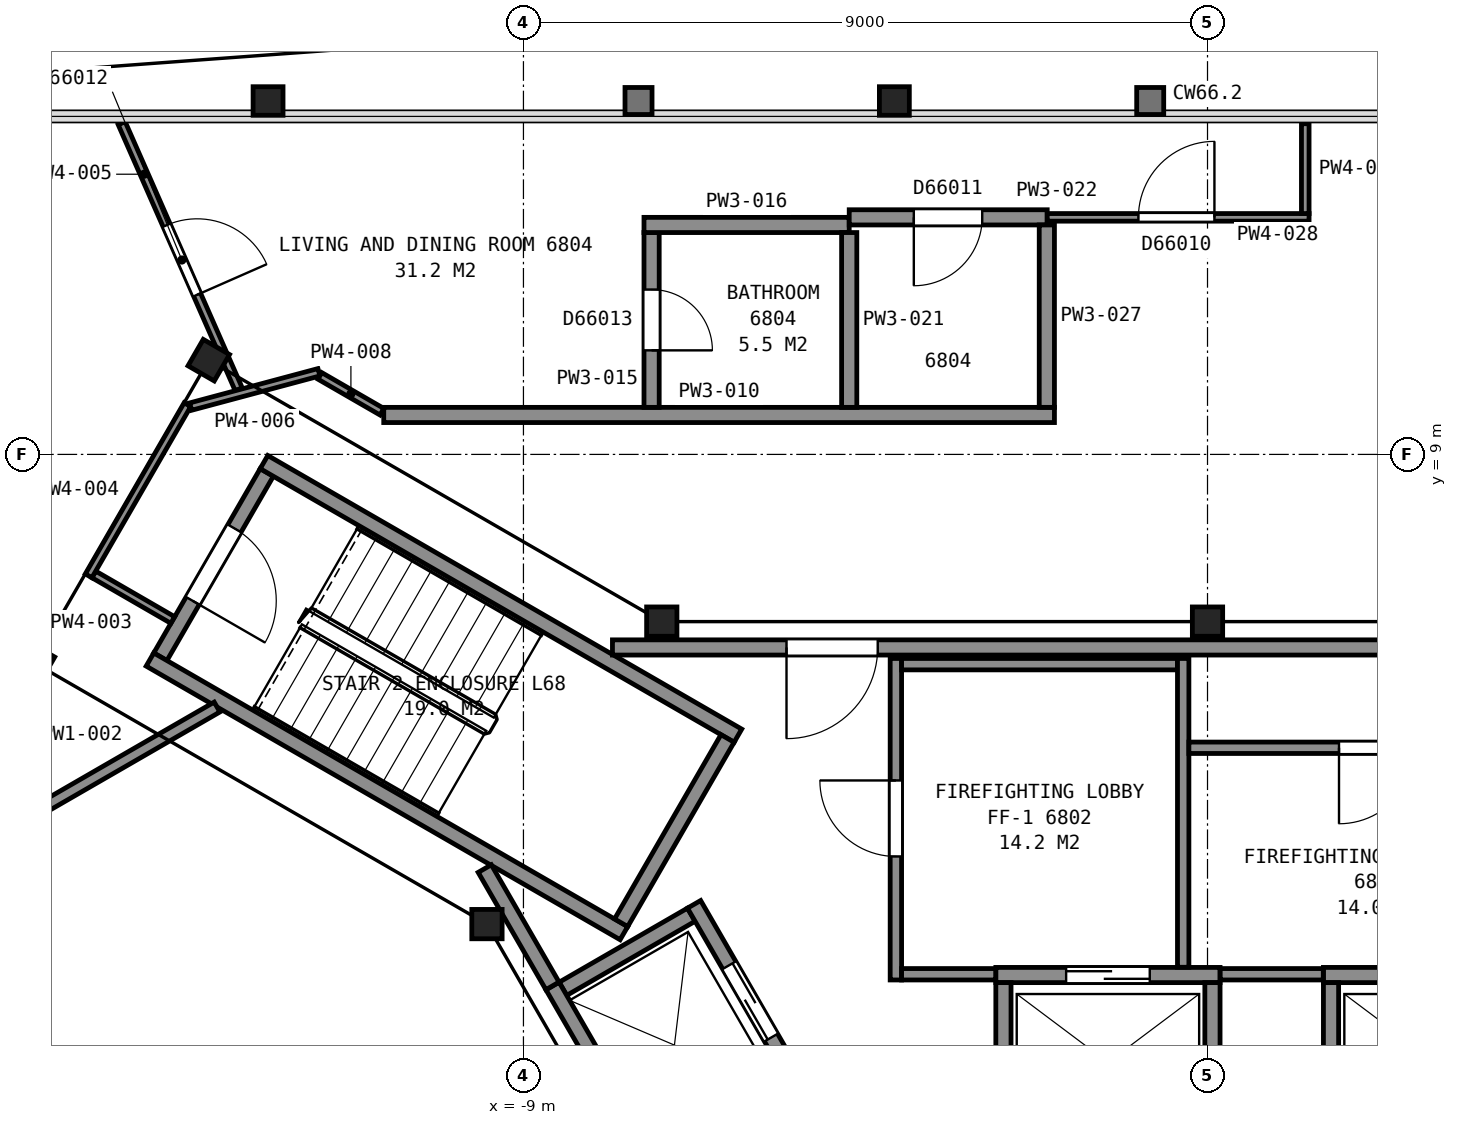
"""IFC4 building model, lengths in metres.
Left out: names, types, materials, properties, quantities, classifications, styles, units other than length and angle.
Written with IfcOpenShell. Run it as: python <this file> out.ifc"""

import sys

from ifc_helpers import new_model, si_unit, direction, frame, frame_2d, origin, origin_2d, place, context, subcontext, project, spatial, rectangle, i_section, extrude, element, fill, save


model = new_model("IFC4")
c1 = context("Model", 3, precision=1e-05, world=origin(), true_north=direction((0.0, 1.0)))
c2 = subcontext(c1, "Body", "Model", "MODEL_VIEW")
j1 = project(units=[si_unit("LENGTHUNIT", "METRE"), si_unit("PLANEANGLEUNIT", "RADIAN")], contexts=[c1])
p1 = place(None, origin())
s1 = spatial("IfcSite", under=j1, at=p1, CompositionType="ELEMENT")
p2 = place(p1, origin())
s2 = spatial("IfcBuilding", under=s1, at=p2, CompositionType="ELEMENT")
p3 = place(p2, frame((0.0, 0.0, 271.4)))
s3 = spatial("IfcBuildingStorey", under=s2, at=p3, CompositionType="ELEMENT", Elevation=271.4)
for number, where, z_axis, x_axis in (
    (1, (-4.12, 13.65, 0.0), (0.0, 0.0, 1.0), (1.0, 0.0, 0.0)),
    (2, (-12.36, 13.65, 0.0), (0.0, 0.0, 1.0), (1.0, 0.0, 0.0)),
):
    element("IfcColumn", number, at=place(p3, frame(where, z_axis=z_axis, x_axis=x_axis)), inside=s3, PredefinedType="COLUMN", context=c2, shape_type="SweptSolid", body=[
        extrude(i_section(OverallWidth=0.394, OverallDepth=0.376, WebThickness=0.017, FlangeThickness=0.028, FilletRadius=0.015, at=origin_2d()), origin(), (0.0, 0.0, 1.0), 3.7),
    ])
for number, where, z_axis, x_axis in (
    (3, (0.0, 6.8, 0.0), (0.0, 0.0, 1.0), (1.0, 0.0, 0.0)),
    (4, (-7.18, 6.8, 0.0), (0.0, 0.0, 1.0), (1.0, 0.0, 0.0)),
):
    element("IfcColumn", number, at=place(p3, frame(where, z_axis=z_axis, x_axis=x_axis)), inside=s3, PredefinedType="COLUMN", context=c2, shape_type="SweptSolid", body=[
        extrude(i_section(OverallWidth=0.399, OverallDepth=0.386, WebThickness=0.021, FlangeThickness=0.033, FilletRadius=0.015, at=origin_2d()), origin(), (0.0, 0.0, 1.0), 3.7),
    ])
for number, where, z_axis, x_axis in (
    (5, (-13.14, 10.24, 0.0), (0.0, 0.0, 1.0), (0.5, 0.866, 0.0)),
    (6, (-15.44, 6.26, 0.0), (0.0, 0.0, 1.0), (0.5, 0.866, 0.0)),
):
    element("IfcColumn", number, at=place(p3, frame(where, z_axis=z_axis, x_axis=x_axis)), inside=s3, PredefinedType="COLUMN", context=c2, shape_type="SweptSolid", body=[
        extrude(i_section(OverallWidth=0.401, OverallDepth=0.399, WebThickness=0.025, FlangeThickness=0.04, FilletRadius=0.015, at=origin_2d()), origin(), (0.0, 0.0, 1.0), 3.7),
    ])
p4 = place(p3, frame((-9.48, 2.82, 0.0), z_axis=(0.0, 0.0, 1.0), x_axis=(1.0, 0.0, 0.0)))
e7 = element("IfcColumn", 7, at=p4, inside=s3, PredefinedType="COLUMN", context=c2, shape_type="SweptSolid", body=[
    extrude(i_section(OverallWidth=0.399, OverallDepth=0.386, WebThickness=0.021, FlangeThickness=0.033, FilletRadius=0.015, at=origin_2d()), origin(), (0.0, 0.0, 1.0), 3.7),
])
p5 = place(p3, frame((-12.377, 8.762, 0.0), z_axis=(0.0, 0.0, 1.0), x_axis=(-0.500049511043, -0.865996816683, 0.0)))
e8 = element("IfcWall", 8, at=p5, inside=s3, PredefinedType="PARTITIONING", context=c2, shape_type="SweptSolid", body=[
    extrude(rectangle(XDim=2.8, YDim=0.2, at=frame_2d((1.4, 0.0))), origin(), (0.0, 0.0, 1.0), 3.45),
])
p6 = place(p5, frame((0.85, 0.0, 0.0)))
e9 = element("IfcOpeningElement", 9, at=p6, cuts=e8, PredefinedType="OPENING", context=c2, shape_type="SweptSolid", body=[
    extrude(rectangle(XDim=1.1, YDim=2.1, at=frame_2d((0.55, 1.05))), frame((0.0, 0.11, 0.0), z_axis=(0.0, -1.0, 0.0), x_axis=(1.0, 0.0, 0.0)), (0.0, 0.0, 1.0), 0.22),
])
for number, where, z_axis, x_axis in (
    (10, (-7.678, 2.701, 0.0), (0.0, 0.0, 1.0), (-0.866, 0.5, 0.0)),
    (11, (-6.178, 5.299, 0.0), (0.0, 0.0, 1.0), (-0.866, 0.5, 0.0)),
):
    element("IfcWall", number, at=place(p3, frame(where, z_axis=z_axis, x_axis=x_axis)), inside=s3, PredefinedType="PARTITIONING", context=c2, shape_type="SweptSolid", body=[
        extrude(rectangle(XDim=7.2, YDim=0.2, at=frame_2d((3.6, 0.0))), origin(), (0.0, 0.0, 1.0), 3.45),
    ])
p7 = place(p3, frame((-6.315, 5.262, 0.0), z_axis=(0.0, 0.0, 1.0), x_axis=(-0.500049511043, -0.865996816683, 0.0)))
e12 = element("IfcWall", 12, at=p7, inside=s3, PredefinedType="PARTITIONING", context=c2, shape_type="SweptSolid", body=[
    extrude(rectangle(XDim=2.8, YDim=0.2, at=frame_2d((1.4, 0.0))), origin(), (0.0, 0.0, 1.0), 3.45),
])
p8 = place(p3, frame((-2.785, 2.15, 0.0), z_axis=(0.0, 0.0, 1.0), x_axis=(1.0, 0.0, 0.0)))
e13 = element("IfcWall", 13, at=p8, inside=s3, PredefinedType="PARTITIONING", context=c2, shape_type="SweptSolid", body=[
    extrude(rectangle(XDim=2.95, YDim=0.2, at=frame_2d((1.475, 0.0))), origin(), (0.0, 0.0, 1.0), 3.7),
])
p9 = place(p8, frame((0.925, 0.0, 0.0)))
e14 = element("IfcOpeningElement", 14, at=p9, cuts=e13, PredefinedType="OPENING", context=c2, shape_type="SweptSolid", body=[
    extrude(rectangle(XDim=1.1, YDim=2.1, at=frame_2d((0.55, 1.05))), frame((0.0, 0.11, 0.0), z_axis=(0.0, -1.0, 0.0), x_axis=(1.0, 0.0, 0.0)), (0.0, 0.0, 1.0), 0.22),
])
p10 = place(p3, frame((1.525, 2.15, 0.0), z_axis=(0.0, 0.0, 1.0), x_axis=(1.0, 0.0, 0.0)))
e15 = element("IfcWall", 15, at=p10, inside=s3, PredefinedType="PARTITIONING", context=c2, shape_type="SweptSolid", body=[
    extrude(rectangle(XDim=2.95, YDim=0.2, at=frame_2d((1.475, 0.0))), origin(), (0.0, 0.0, 1.0), 3.7),
])
p11 = place(p10, frame((0.925, 0.0, 0.0)))
e16 = element("IfcOpeningElement", 16, at=p11, cuts=e15, PredefinedType="OPENING", context=c2, shape_type="SweptSolid", body=[
    extrude(rectangle(XDim=1.1, YDim=2.1, at=frame_2d((0.55, 1.05))), frame((0.0, 0.11, 0.0), z_axis=(0.0, -1.0, 0.0), x_axis=(1.0, 0.0, 0.0)), (0.0, 0.0, 1.0), 0.22),
])
for number, where, z_axis, x_axis in (
    (17, (-8.48, 1.969, 0.0), (0.0, 0.0, 1.0), (0.866, 0.5, 0.0)),
    (18, (1.625, 0.1, 0.0), (0.0, 0.0, 1.0), (0.0, 1.0, 0.0)),
    (19, (0.065, 0.1, 0.0), (0.0, 0.0, 1.0), (0.0, 1.0, 0.0)),
    (20, (-2.685, 0.1, 0.0), (0.0, 0.0, 1.0), (0.0, 1.0, 0.0)),
):
    element("IfcWall", number, at=place(p3, frame(where, z_axis=z_axis, x_axis=x_axis)), inside=s3, PredefinedType="PARTITIONING", context=c2, shape_type="SweptSolid", body=[
        extrude(rectangle(XDim=1.95, YDim=0.2, at=frame_2d((0.975, 0.0))), origin(), (0.0, 0.0, 1.0), 3.7),
    ])
p12 = place(p3, frame((-5.28, 0.525, 0.0), z_axis=(0.0, 0.0, 1.0), x_axis=(-0.500037662692, 0.866003658127, 0.0)))
e21 = element("IfcWall", 21, at=p12, inside=s3, PredefinedType="PARTITIONING", context=c2, shape_type="SweptSolid", body=[
    extrude(rectangle(XDim=2.95, YDim=0.2, at=frame_2d((1.475, 0.0))), origin(), (0.0, 0.0, 1.0), 3.7),
])
p13 = place(p12, frame((0.925, 0.0, 0.0)))
e22 = element("IfcOpeningElement", 22, at=p13, cuts=e21, PredefinedType="OPENING", context=c2, shape_type="SweptSolid", body=[
    extrude(rectangle(XDim=1.1, YDim=2.1, at=frame_2d((0.55, 1.05))), frame((0.0, 0.11, 0.0), z_axis=(0.0, -1.0, 0.0), x_axis=(1.0, 0.0, 0.0)), (0.0, 0.0, 1.0), 0.22),
])
p14 = place(p3, frame((-7.142, -0.55, 0.0), z_axis=(0.0, 0.0, 1.0), x_axis=(-0.49997559174, 0.866039495442, 0.0)))
e23 = element("IfcWall", 23, at=p14, inside=s3, PredefinedType="PARTITIONING", context=c2, shape_type="SweptSolid", body=[
    extrude(rectangle(XDim=2.95, YDim=0.2, at=frame_2d((1.475, 0.0))), origin(), (0.0, 0.0, 1.0), 3.7),
])
p15 = place(p3, frame((-9.509, 3.551, 0.0), z_axis=(0.0, 0.0, 1.0), x_axis=(0.499999136801, -0.866025902152, 0.0)))
e24 = element("IfcWall", 24, at=p15, inside=s3, PredefinedType="PARTITIONING", context=c2, shape_type="SweptSolid", body=[
    extrude(rectangle(XDim=1.782, YDim=0.2, at=frame_2d((0.891, 0.0))), origin(), (0.0, 0.0, 1.0), 3.45),
])
p16 = place(p3, frame((7.829, 6.46, 0.0), z_axis=(0.0, 0.0, 1.0), x_axis=(-1.0, 0.0, 0.0)))
e25 = element("IfcWall", 25, at=p16, inside=s3, PredefinedType="PARTITIONING", context=c2, shape_type="SweptSolid", body=[
    extrude(rectangle(XDim=15.658, YDim=0.2, at=frame_2d((7.829, 0.0))), origin(), (0.0, 0.0, 1.0), 3.45),
])
p17 = place(p16, frame((12.168, 0.0, 0.0)))
e26 = element("IfcOpeningElement", 26, at=p17, cuts=e25, PredefinedType="OPENING", context=c2, shape_type="SweptSolid", body=[
    extrude(rectangle(XDim=1.2, YDim=2.1, at=frame_2d((0.6, 1.05))), frame((0.0, 0.11, 0.0), z_axis=(0.0, -1.0, 0.0), x_axis=(1.0, 0.0, 0.0)), (0.0, 0.0, 1.0), 0.22),
])
p18 = place(p3, frame((-4.1, 2.085, 0.0), z_axis=(0.0, 0.0, 1.0), x_axis=(0.0, 1.0, 0.0)))
e27 = element("IfcWall", 27, at=p18, inside=s3, PredefinedType="PARTITIONING", context=c2, shape_type="SweptSolid", body=[
    extrude(rectangle(XDim=4.23, YDim=0.15, at=frame_2d((2.115, 0.0))), origin(), (0.0, 0.0, 1.0), 3.45),
])
p19 = place(p18, frame((1.625, 0.0, 0.0)))
e28 = element("IfcOpeningElement", 28, at=p19, cuts=e27, PredefinedType="OPENING", context=c2, shape_type="SweptSolid", body=[
    extrude(rectangle(XDim=1.0, YDim=2.1, at=frame_2d((0.5, 1.05))), frame((0.0, 0.085, 0.0), z_axis=(0.0, -1.0, 0.0), x_axis=(1.0, 0.0, 0.0)), (0.0, 0.0, 1.0), 0.17),
])
p20 = place(p3, frame((-4.025, 2.16, 0.0), z_axis=(0.0, 0.0, 1.0), x_axis=(1.0, 0.0, 0.0)))
e29 = element("IfcWall", 29, at=p20, inside=s3, PredefinedType="PARTITIONING", context=c2, shape_type="SweptSolid", body=[
    extrude(rectangle(XDim=1.238, YDim=0.15, at=frame_2d((0.619, 0.0))), origin(), (0.0, 0.0, 1.0), 3.45),
])
p21 = place(p3, frame((-4.025, 6.24, 0.0), z_axis=(0.0, 0.0, 1.0), x_axis=(1.0, 0.0, 0.0)))
e30 = element("IfcWall", 30, at=p21, inside=s3, PredefinedType="PARTITIONING", context=c2, shape_type="SweptSolid", body=[
    extrude(rectangle(XDim=3.63, YDim=0.15, at=frame_2d((1.815, 0.0))), origin(), (0.0, 0.0, 1.0), 3.45),
])
p22 = place(p3, frame((-0.32, 2.252, 0.0), z_axis=(0.0, 0.0, 1.0), x_axis=(0.0, 1.0, 0.0)))
e31 = element("IfcWall", 31, at=p22, inside=s3, PredefinedType="PARTITIONING", context=c2, shape_type="SweptSolid", body=[
    extrude(rectangle(XDim=4.063, YDim=0.15, at=frame_2d((2.031, 0.0))), origin(), (0.0, 0.0, 1.0), 3.45),
])
p23 = place(p3, frame((-0.245, 5.14, 0.0), z_axis=(0.0, 0.0, 1.0), x_axis=(1.0, 0.0, 0.0)))
e32 = element("IfcWall", 32, at=p23, inside=s3, PredefinedType="PARTITIONING", context=c2, shape_type="SweptSolid", body=[
    extrude(rectangle(XDim=5.11, YDim=0.15, at=frame_2d((2.555, 0.0))), origin(), (0.0, 0.0, 1.0), 3.45),
])
p24 = place(p23, frame((1.975, 0.0, 0.0)))
e33 = element("IfcOpeningElement", 33, at=p24, cuts=e32, PredefinedType="OPENING", context=c2, shape_type="SweptSolid", body=[
    extrude(rectangle(XDim=1.0, YDim=2.1, at=frame_2d((0.5, 1.05))), frame((0.0, 0.085, 0.0), z_axis=(0.0, -1.0, 0.0), x_axis=(1.0, 0.0, 0.0)), (0.0, 0.0, 1.0), 0.17),
])
p25 = place(p3, frame((0.167, 2.16, 0.0), z_axis=(0.0, 0.0, 1.0), x_axis=(1.0, 0.0, 0.0)))
e34 = element("IfcWall", 34, at=p25, inside=s3, PredefinedType="PARTITIONING", context=c2, shape_type="SweptSolid", body=[
    extrude(rectangle(XDim=1.356, YDim=0.15, at=frame_2d((0.678, 0.0))), origin(), (0.0, 0.0, 1.0), 3.45),
])
p26 = place(p3, frame((-15.489, 4.257, 0.0), z_axis=(0.0, 0.0, 1.0), x_axis=(0.866053804324, 0.499950805595, 0.0)))
e35 = element("IfcWall", 35, at=p26, inside=s3, PredefinedType="PARTITIONING", context=c2, shape_type="SweptSolid", body=[
    extrude(rectangle(XDim=2.838, YDim=0.15, at=frame_2d((1.419, 0.0))), origin(), (0.0, 0.0, 1.0), 2.723),
])
p27 = place(p3, frame((-14.653, 7.421, 0.0), z_axis=(0.0, 0.0, 1.0), x_axis=(0.865941482684, -0.500145327446, 0.0)))
e36 = element("IfcWall", 36, at=p27, inside=s3, PredefinedType="PARTITIONING", context=c2, shape_type="SweptSolid", body=[
    extrude(rectangle(XDim=1.199, YDim=0.1, at=frame_2d((0.6, 0.0))), origin(), (0.0, 0.0, 1.0), 2.723),
])
p28 = place(p3, frame((-14.721, 7.403, 0.0), z_axis=(0.0, 0.0, 1.0), x_axis=(0.500006934395, 0.866021400173, 0.0)))
e37 = element("IfcWall", 37, at=p28, inside=s3, PredefinedType="PARTITIONING", context=c2, shape_type="SweptSolid", body=[
    extrude(rectangle(XDim=2.6, YDim=0.1, at=frame_2d((1.3, 0.0))), origin(), (0.0, 0.0, 1.0), 2.723),
])
p29 = place(p3, frame((-12.747, 9.857, 0.0), z_axis=(0.0, 0.0, 1.0), x_axis=(-0.402509649346, 0.91541574281, 0.0)))
e38 = element("IfcWall", 38, at=p29, inside=s3, PredefinedType="PARTITIONING", context=c2, shape_type="SweptSolid", body=[
    extrude(rectangle(XDim=3.824, YDim=0.1, at=frame_2d((1.912, 0.0))), origin(), (0.0, 0.0, 1.0), 2.723),
])
p30 = place(p29, frame((1.357, 0.0, 0.0)))
e39 = element("IfcOpeningElement", 39, at=p30, cuts=e38, PredefinedType="OPENING", context=c2, shape_type="SweptSolid", body=[
    extrude(rectangle(XDim=1.0, YDim=2.1, at=frame_2d((0.5, 1.05))), frame((0.0, 0.06, 0.0), z_axis=(0.0, -1.0, 0.0), x_axis=(1.0, 0.0, 0.0)), (0.0, 0.0, 1.0), 0.12),
])
p31 = place(p3, frame((-13.378, 9.629, 0.0), z_axis=(0.0, 0.0, 1.0), x_axis=(0.966007272337, 0.258514892785, 0.0)))
e40 = element("IfcWall", 40, at=p31, inside=s3, PredefinedType="PARTITIONING", context=c2, shape_type="SweptSolid", body=[
    extrude(rectangle(XDim=1.747, YDim=0.1, at=frame_2d((0.874, 0.0))), origin(), (0.0, 0.0, 1.0), 2.723),
])
p32 = place(p3, frame((-11.678, 10.033, 0.0), z_axis=(0.0, 0.0, 1.0), x_axis=(0.866116627388, -0.499841962787, 0.0)))
e41 = element("IfcWall", 41, at=p32, inside=s3, PredefinedType="PARTITIONING", context=c2, shape_type="SweptSolid", body=[
    extrude(rectangle(XDim=0.943, YDim=0.1, at=frame_2d((0.472, 0.0))), origin(), (0.0, 0.0, 1.0), 2.723),
])
p33 = place(p3, frame((-10.838, 9.519, 0.0), z_axis=(0.0, 0.0, 1.0), x_axis=(1.0, 0.0, 0.0)))
e42 = element("IfcWall", 42, at=p33, inside=s3, PredefinedType="PARTITIONING", context=c2, shape_type="SweptSolid", body=[
    extrude(rectangle(XDim=8.824, YDim=0.2, at=frame_2d((4.412, 0.0))), origin(), (0.0, 0.0, 1.0), 2.723),
])
p34 = place(p3, frame((-7.314, 11.919, 0.0), z_axis=(0.0, 0.0, 1.0), x_axis=(0.0, -1.0, 0.0)))
e43 = element("IfcWall", 43, at=p34, inside=s3, PredefinedType="PARTITIONING", context=c2, shape_type="SweptSolid", body=[
    extrude(rectangle(XDim=2.3, YDim=0.2, at=frame_2d((1.15, 0.0))), origin(), (0.0, 0.0, 1.0), 2.723),
])
p35 = place(p34, frame((0.75, 0.0, 0.0)))
e44 = element("IfcOpeningElement", 44, at=p35, cuts=e43, PredefinedType="OPENING", context=c2, shape_type="SweptSolid", body=[
    extrude(rectangle(XDim=0.8, YDim=2.1, at=frame_2d((0.4, 1.05))), frame((0.0, 0.11, 0.0), z_axis=(0.0, -1.0, 0.0), x_axis=(1.0, 0.0, 0.0)), (0.0, 0.0, 1.0), 0.22),
])
p36 = place(p3, frame((-7.414, 12.019, 0.0), z_axis=(0.0, 0.0, 1.0), x_axis=(1.0, 0.0, 0.0)))
e45 = element("IfcWall", 45, at=p36, inside=s3, PredefinedType="PARTITIONING", context=c2, shape_type="SweptSolid", body=[
    extrude(rectangle(XDim=2.7, YDim=0.2, at=frame_2d((1.35, 0.0))), origin(), (0.0, 0.0, 1.0), 2.723),
])
p37 = place(p3, frame((-4.714, 9.619, 0.0), z_axis=(0.0, 0.0, 1.0), x_axis=(0.0, 1.0, 0.0)))
e46 = element("IfcWall", 46, at=p37, inside=s3, PredefinedType="PARTITIONING", context=c2, shape_type="SweptSolid", body=[
    extrude(rectangle(XDim=2.3, YDim=0.2, at=frame_2d((1.15, 0.0))), origin(), (0.0, 0.0, 1.0), 2.723),
])
p38 = place(p3, frame((-2.109, 12.119, 0.0), z_axis=(0.0, 0.0, 1.0), x_axis=(-1.0, 0.0, 0.0)))
e47 = element("IfcWall", 47, at=p38, inside=s3, PredefinedType="PARTITIONING", context=c2, shape_type="SweptSolid", body=[
    extrude(rectangle(XDim=2.605, YDim=0.2, at=frame_2d((1.303, 0.0))), origin(), (0.0, 0.0, 1.0), 2.723),
])
p39 = place(p38, frame((0.855, 0.0, 0.0)))
e48 = element("IfcOpeningElement", 48, at=p39, cuts=e47, PredefinedType="OPENING", context=c2, shape_type="SweptSolid", body=[
    extrude(rectangle(XDim=0.9, YDim=2.1, at=frame_2d((0.45, 1.05))), frame((0.0, 0.11, 0.0), z_axis=(0.0, -1.0, 0.0), x_axis=(1.0, 0.0, 0.0)), (0.0, 0.0, 1.0), 0.22),
])
p40 = place(p3, frame((-2.114, 9.619, 0.0), z_axis=(0.0, 0.0, 1.0), x_axis=(0.0, 1.0, 0.0)))
e49 = element("IfcWall", 49, at=p40, inside=s3, PredefinedType="PARTITIONING", context=c2, shape_type="SweptSolid", body=[
    extrude(rectangle(XDim=2.4, YDim=0.2, at=frame_2d((1.2, 0.0))), origin(), (0.0, 0.0, 1.0), 2.723),
])
p41 = place(p3, frame((-2.109, 12.119, 0.0), z_axis=(0.0, 0.0, 1.0), x_axis=(1.0, 0.0, 0.0)))
e50 = element("IfcWall", 50, at=p41, inside=s3, PredefinedType="PARTITIONING", context=c2, shape_type="SweptSolid", body=[
    extrude(rectangle(XDim=3.445, YDim=0.1, at=frame_2d((1.722, 0.0))), origin(), (0.0, 0.0, 1.0), 2.723),
])
p42 = place(p41, frame((1.2, 0.0, 0.0)))
e51 = element("IfcOpeningElement", 51, at=p42, cuts=e50, PredefinedType="OPENING", context=c2, shape_type="SweptSolid", body=[
    extrude(rectangle(XDim=1.0, YDim=2.1, at=frame_2d((0.5, 1.05))), frame((0.0, 0.06, 0.0), z_axis=(0.0, -1.0, 0.0), x_axis=(1.0, 0.0, 0.0)), (0.0, 0.0, 1.0), 0.12),
])
p43 = place(p3, frame((1.286, 12.169, 0.0), z_axis=(0.0, 0.0, 1.0), x_axis=(0.0, 1.0, 0.0)))
e52 = element("IfcWall", 52, at=p43, inside=s3, PredefinedType="PARTITIONING", context=c2, shape_type="SweptSolid", body=[
    extrude(rectangle(XDim=1.182, YDim=0.1, at=frame_2d((0.591, 0.0))), origin(), (0.0, 0.0, 1.0), 2.723),
])
p44 = place(p6, origin())
e53 = element("IfcDoor", 53, at=p44, inside=s3, OperationType="SINGLE_SWING_RIGHT", PredefinedType="DOOR", context=c2, shape_type="SweptSolid", body=[
    extrude(rectangle(XDim=1.1, YDim=2.1, at=frame_2d((0.55, 1.05))), frame((0.0, 0.025, 0.0), z_axis=(0.0, -1.0, 0.0), x_axis=(1.0, 0.0, 0.0)), (0.0, 0.0, 1.0), 0.05),
])
fill(e9, e53)
p45 = place(p9, origin())
e54 = element("IfcDoor", 54, at=p45, inside=s3, OperationType="SLIDING_TO_LEFT", PredefinedType="DOOR", context=c2, shape_type="SweptSolid", body=[
    extrude(rectangle(XDim=1.1, YDim=2.1, at=frame_2d((0.55, 1.05))), frame((0.0, 0.025, 0.0), z_axis=(0.0, -1.0, 0.0), x_axis=(1.0, 0.0, 0.0)), (0.0, 0.0, 1.0), 0.05),
])
fill(e14, e54)
p46 = place(p13, origin())
e55 = element("IfcDoor", 55, at=p46, inside=s3, OperationType="SLIDING_TO_LEFT", PredefinedType="DOOR", context=c2, shape_type="SweptSolid", body=[
    extrude(rectangle(XDim=1.1, YDim=2.1, at=frame_2d((0.55, 1.05))), frame((0.0, 0.025, 0.0), z_axis=(0.0, -1.0, 0.0), x_axis=(1.0, 0.0, 0.0)), (0.0, 0.0, 1.0), 0.05),
])
fill(e22, e55)
p47 = place(p17, origin())
e56 = element("IfcDoor", 56, at=p47, inside=s3, OperationType="SINGLE_SWING_RIGHT", PredefinedType="DOOR", context=c2, shape_type="SweptSolid", body=[
    extrude(rectangle(XDim=1.2, YDim=2.1, at=frame_2d((0.6, 1.05))), frame((0.0, 0.025, 0.0), z_axis=(0.0, -1.0, 0.0), x_axis=(1.0, 0.0, 0.0)), (0.0, 0.0, 1.0), 0.05),
])
fill(e26, e56)
p48 = place(p19, origin())
e57 = element("IfcDoor", 57, at=p48, inside=s3, OperationType="SINGLE_SWING_RIGHT", PredefinedType="DOOR", context=c2, shape_type="SweptSolid", body=[
    extrude(rectangle(XDim=1.0, YDim=2.1, at=frame_2d((0.5, 1.05))), frame((0.0, 0.025, 0.0), z_axis=(0.0, -1.0, 0.0), x_axis=(1.0, 0.0, 0.0)), (0.0, 0.0, 1.0), 0.05),
])
fill(e28, e57)
p49 = place(p24, origin())
e58 = element("IfcDoor", 58, at=p49, inside=s3, OperationType="SINGLE_SWING_LEFT", PredefinedType="DOOR", context=c2, shape_type="SweptSolid", body=[
    extrude(rectangle(XDim=1.0, YDim=2.1, at=frame_2d((0.5, 1.05))), frame((0.0, 0.025, 0.0), z_axis=(0.0, -1.0, 0.0), x_axis=(1.0, 0.0, 0.0)), (0.0, 0.0, 1.0), 0.05),
])
fill(e33, e58)
p50 = place(p30, origin())
e59 = element("IfcDoor", 59, at=p50, inside=s3, OperationType="SINGLE_SWING_LEFT", PredefinedType="DOOR", context=c2, shape_type="SweptSolid", body=[
    extrude(rectangle(XDim=1.0, YDim=2.1, at=frame_2d((0.5, 1.05))), frame((0.0, 0.025, 0.0), z_axis=(0.0, -1.0, 0.0), x_axis=(1.0, 0.0, 0.0)), (0.0, 0.0, 1.0), 0.05),
])
fill(e39, e59)
p51 = place(p35, origin())
e60 = element("IfcDoor", 60, at=p51, inside=s3, OperationType="SINGLE_SWING_RIGHT", PredefinedType="DOOR", context=c2, shape_type="SweptSolid", body=[
    extrude(rectangle(XDim=0.8, YDim=2.1, at=frame_2d((0.4, 1.05))), frame((0.0, 0.025, 0.0), z_axis=(0.0, -1.0, 0.0), x_axis=(1.0, 0.0, 0.0)), (0.0, 0.0, 1.0), 0.05),
])
fill(e44, e60)
p52 = place(p39, origin())
e61 = element("IfcDoor", 61, at=p52, inside=s3, OperationType="SINGLE_SWING_RIGHT", PredefinedType="DOOR", context=c2, shape_type="SweptSolid", body=[
    extrude(rectangle(XDim=0.9, YDim=2.1, at=frame_2d((0.45, 1.05))), frame((0.0, 0.025, 0.0), z_axis=(0.0, -1.0, 0.0), x_axis=(1.0, 0.0, 0.0)), (0.0, 0.0, 1.0), 0.05),
])
fill(e48, e61)
p53 = place(p42, origin())
e62 = element("IfcDoor", 62, at=p53, inside=s3, OperationType="SINGLE_SWING_RIGHT", PredefinedType="DOOR", context=c2, shape_type="SweptSolid", body=[
    extrude(rectangle(XDim=1.0, YDim=2.1, at=frame_2d((0.5, 1.05))), frame((0.0, 0.025, 0.0), z_axis=(0.0, -1.0, 0.0), x_axis=(1.0, 0.0, 0.0)), (0.0, 0.0, 1.0), 0.05),
])
fill(e51, e62)
save(model, sys.argv[1])
